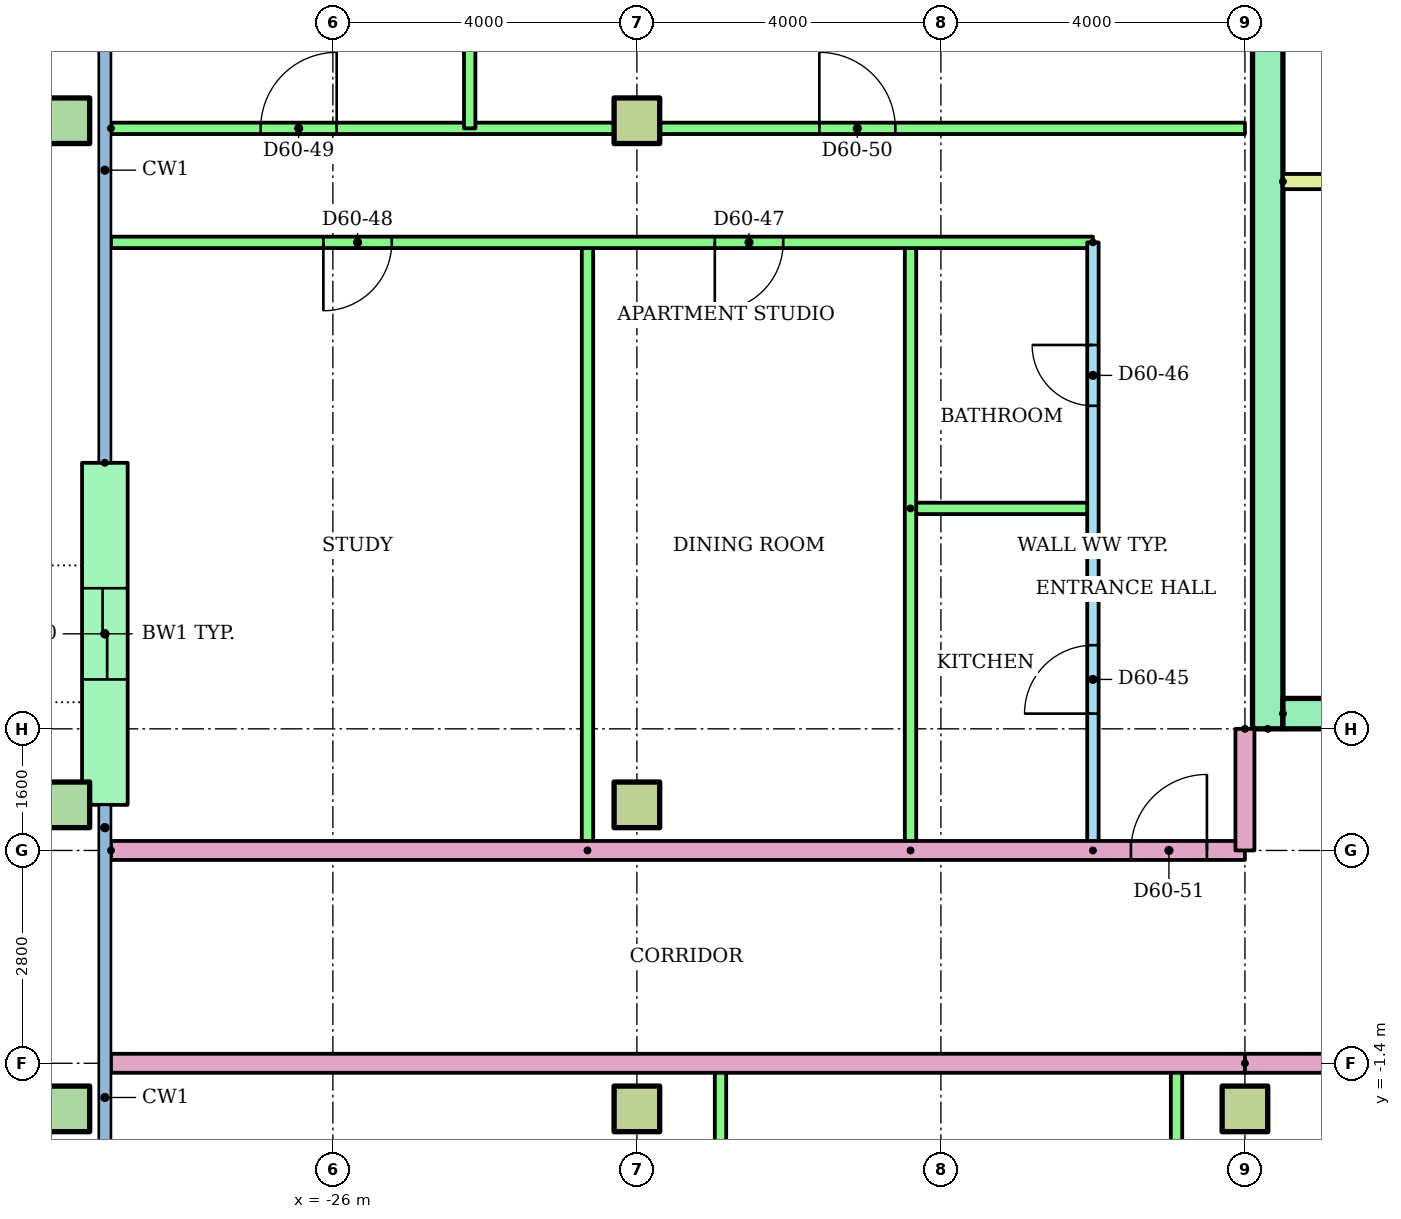
"""IFC4 building model, lengths in metres.
Left out: names, types, materials, properties, quantities, classifications, styles, units other than length and angle.
Written with IfcOpenShell. Run it as: python <this file> out.ifc"""

import sys

from ifc_helpers import new_model, si_unit, direction, frame, frame_2d, origin, origin_2d, place, context, subcontext, project, spatial, rectangle, hollow_rectangle, extrude, element, fill, save


model = new_model("IFC4")
c1 = context("Model", 3, precision=1e-05, world=origin(), true_north=direction((0.0, 1.0)))
c2 = subcontext(c1, "Body", "Model", "MODEL_VIEW")
j1 = project(units=[si_unit("LENGTHUNIT", "METRE"), si_unit("PLANEANGLEUNIT", "RADIAN")], contexts=[c1])
p1 = place(None, origin())
s1 = spatial("IfcSite", under=j1, at=p1, CompositionType="ELEMENT")
p2 = place(p1, origin())
s2 = spatial("IfcBuilding", under=s1, at=p2, CompositionType="ELEMENT")
p3 = place(p2, frame((0.0, 0.0, 230.0)))
s3 = spatial("IfcBuildingStorey", under=s2, at=p3, CompositionType="ELEMENT", Elevation=230.0)
p4 = place(p3, frame((-29.5, -2.0, 0.0)))
e1 = element("IfcColumn", 1, at=p4, inside=s3, PredefinedType="COLUMN", context=c2, shape_type="SweptSolid", body=[
    extrude(hollow_rectangle(XDim=0.6, YDim=0.6, WallThickness=0.03, at=origin_2d()), origin(), (0.0, 0.0, 1.0), 3.2),
])
for number, where in (
    (2, (-22.0, -2.0, 0.0)),
    (3, (-14.0, -2.0, 0.0)),
):
    element("IfcColumn", number, at=place(p3, frame(where)), inside=s3, PredefinedType="COLUMN", context=c2, shape_type="SweptSolid", body=[
        extrude(rectangle(XDim=0.6, YDim=0.6, at=origin_2d()), origin(), (0.0, 0.0, 1.0), 3.2),
    ])
p5 = place(p3, frame((-29.5, 2.0, 0.0)))
e4 = element("IfcColumn", 4, at=p5, inside=s3, PredefinedType="COLUMN", context=c2, shape_type="SweptSolid", body=[
    extrude(hollow_rectangle(XDim=0.6, YDim=0.6, WallThickness=0.03, at=origin_2d()), origin(), (0.0, 0.0, 1.0), 3.2),
])
p6 = place(p3, frame((-22.0, 2.0, 0.0)))
e5 = element("IfcColumn", 5, at=p6, inside=s3, PredefinedType="COLUMN", context=c2, shape_type="SweptSolid", body=[
    extrude(rectangle(XDim=0.6, YDim=0.6, at=origin_2d()), origin(), (0.0, 0.0, 1.0), 3.2),
])
p7 = place(p3, frame((-29.5, 11.0, 0.0)))
e6 = element("IfcColumn", 6, at=p7, inside=s3, PredefinedType="COLUMN", context=c2, shape_type="SweptSolid", body=[
    extrude(hollow_rectangle(XDim=0.6, YDim=0.6, WallThickness=0.03, at=origin_2d()), origin(), (0.0, 0.0, 1.0), 3.2),
])
p8 = place(p3, frame((-22.0, 11.0, 0.0)))
e7 = element("IfcColumn", 7, at=p8, inside=s3, PredefinedType="COLUMN", context=c2, shape_type="SweptSolid", body=[
    extrude(rectangle(XDim=0.6, YDim=0.6, at=origin_2d()), origin(), (0.0, 0.0, 1.0), 3.2),
])
p9 = place(p3, frame((-29.0, 6.5, 0.0), z_axis=(0.0, 0.0, 1.0), x_axis=(0.0, -1.0, 0.0)))
e8 = element("IfcWall", 8, at=p9, inside=s3, PredefinedType="STANDARD", context=c2, shape_type="SweptSolid", body=[
    extrude(rectangle(XDim=4.5, YDim=0.6, at=frame_2d((2.25, 0.0))), origin(), (0.0, 0.0, 1.0), 2.92),
])
p10 = place(p9, frame((1.65, 0.0, 0.0)))
e9 = element("IfcOpeningElement", 9, at=p10, cuts=e8, PredefinedType="OPENING", context=c2, shape_type="SweptSolid", body=[
    extrude(rectangle(XDim=1.2, YDim=2.1, at=frame_2d((0.6, 1.05))), frame((0.0, 0.31, 0.0), z_axis=(0.0, -1.0, 0.0), x_axis=(1.0, 0.0, 0.0)), (0.0, 0.0, 1.0), 0.62),
])
p11 = place(p3, frame((-13.7, 3.0, 0.0), z_axis=(0.0, 0.0, 1.0), x_axis=(0.0, 1.0, 0.0)))
e10 = element("IfcWall", 10, at=p11, inside=s3, PredefinedType="SHEAR", context=c2, shape_type="SweptSolid", body=[
    extrude(rectangle(XDim=17.0, YDim=0.4, at=frame_2d((8.5, 0.0))), origin(), (0.0, 0.0, 1.0), 2.92),
])
p12 = place(p3, frame((-13.5, 3.2, 0.0)))
e11 = element("IfcWall", 11, at=p12, inside=s3, PredefinedType="SHEAR", context=c2, shape_type="SweptSolid", body=[
    extrude(rectangle(XDim=27.0, YDim=0.4, at=frame_2d((13.5, 0.0))), origin(), (0.0, 0.0, 1.0), 2.92),
])
p13 = place(p12, frame((22.083, 0.0, 0.0)))
e12 = element("IfcOpeningElement", 12, at=p13, cuts=e11, PredefinedType="OPENING", context=c2, shape_type="SweptSolid", body=[
    extrude(rectangle(XDim=1.1, YDim=2.1, at=frame_2d((0.55, 1.05))), frame((0.0, 0.21, 0.0), z_axis=(0.0, -1.0, 0.0), x_axis=(1.0, 0.0, 0.0)), (0.0, 0.0, 1.0), 0.42),
])
p14 = place(p12, frame((25.128, 0.0, 0.0)))
e13 = element("IfcOpeningElement", 13, at=p14, cuts=e11, PredefinedType="OPENING", context=c2, shape_type="SweptSolid", body=[
    extrude(rectangle(XDim=1.1, YDim=2.1, at=frame_2d((0.55, 1.05))), frame((0.0, 0.21, 0.0), z_axis=(0.0, -1.0, 0.0), x_axis=(1.0, 0.0, 0.0)), (0.0, 0.0, 1.0), 0.42),
])
p15 = place(p12, frame((12.6, 0.0, 0.0)))
e14 = element("IfcOpeningElement", 14, at=p15, cuts=e11, PredefinedType="OPENING", context=c2, shape_type="SweptSolid", body=[
    extrude(rectangle(XDim=1.8, YDim=2.1, at=frame_2d((0.9, 1.05))), frame((0.0, 0.21, 0.0), z_axis=(0.0, -1.0, 0.0), x_axis=(1.0, 0.0, 0.0)), (0.0, 0.0, 1.0), 0.42),
])
p16 = place(p3, frame((-13.5, 10.2, 0.0)))
e15 = element("IfcWall", 15, at=p16, inside=s3, PredefinedType="PARTITIONING", context=c2, shape_type="SweptSolid", body=[
    extrude(rectangle(XDim=3.9, YDim=0.2, at=frame_2d((1.95, 0.0))), origin(), (0.0, 0.0, 1.0), 2.92),
])
for number, where, z_axis, x_axis in (
    (16, (-14.9, -7.0, 0.0), (0.0, 0.0, 1.0), (0.0, 1.0, 0.0)),
    (17, (-20.9, -7.0, 0.0), (0.0, 0.0, 1.0), (0.0, 1.0, 0.0)),
):
    element("IfcWall", number, at=place(p3, frame(where, z_axis=z_axis, x_axis=x_axis)), inside=s3, PredefinedType="PARTITIONING", context=c2, shape_type="SweptSolid", body=[
        extrude(rectangle(XDim=5.6, YDim=0.15, at=frame_2d((2.8, 0.0))), origin(), (0.0, 0.0, 1.0), 2.4),
    ])
p17 = place(p3, frame((-14.0, -1.4, 0.0), z_axis=(0.0, 0.0, 1.0), x_axis=(-1.0, 0.0, 0.0)))
e18 = element("IfcWall", 18, at=p17, inside=s3, PredefinedType="PARTITIONING", context=c2, shape_type="SweptSolid", body=[
    extrude(rectangle(XDim=14.92, YDim=0.25, at=frame_2d((7.46, 0.0))), origin(), (0.0, 0.0, 1.0), 2.4),
])
p18 = place(p3, frame((-16.0, 1.4, 0.0), z_axis=(0.0, 0.0, 1.0), x_axis=(0.0, 1.0, 0.0)))
e19 = element("IfcWall", 19, at=p18, inside=s3, PredefinedType="PARTITIONING", context=c2, shape_type="SweptSolid", body=[
    extrude(rectangle(XDim=8.0, YDim=0.15, at=frame_2d((4.0, 0.0))), origin(), (0.0, 0.0, 1.0), 2.4),
])
p19 = place(p18, frame((1.8, 0.0, 0.0)))
e20 = element("IfcOpeningElement", 20, at=p19, cuts=e19, PredefinedType="OPENING", context=c2, shape_type="SweptSolid", body=[
    extrude(rectangle(XDim=0.9, YDim=2.1, at=frame_2d((0.45, 1.05))), frame((0.0, 0.085, 0.0), z_axis=(0.0, -1.0, 0.0), x_axis=(1.0, 0.0, 0.0)), (0.0, 0.0, 1.0), 0.17),
])
p20 = place(p18, frame((5.85, 0.0, 0.0)))
e21 = element("IfcOpeningElement", 21, at=p20, cuts=e19, PredefinedType="OPENING", context=c2, shape_type="SweptSolid", body=[
    extrude(rectangle(XDim=0.8, YDim=2.1, at=frame_2d((0.4, 1.05))), frame((0.0, 0.085, 0.0), z_axis=(0.0, -1.0, 0.0), x_axis=(1.0, 0.0, 0.0)), (0.0, 0.0, 1.0), 0.17),
])
p21 = place(p3, frame((-18.4, 5.9, 0.0)))
e22 = element("IfcWall", 22, at=p21, inside=s3, PredefinedType="PARTITIONING", context=c2, shape_type="SweptSolid", body=[
    extrude(rectangle(XDim=2.4, YDim=0.15, at=frame_2d((1.2, 0.0))), origin(), (0.0, 0.0, 1.0), 2.4),
])
for number, where, z_axis, x_axis in (
    (23, (-18.4, 1.4, 0.0), (0.0, 0.0, 1.0), (0.0, 1.0, 0.0)),
    (24, (-22.65, 1.4, 0.0), (0.0, 0.0, 1.0), (0.0, 1.0, 0.0)),
):
    element("IfcWall", number, at=place(p3, frame(where, z_axis=z_axis, x_axis=x_axis)), inside=s3, PredefinedType="PARTITIONING", context=c2, shape_type="SweptSolid", body=[
        extrude(rectangle(XDim=8.0, YDim=0.15, at=frame_2d((4.0, 0.0))), origin(), (0.0, 0.0, 1.0), 2.4),
    ])
p22 = place(p3, frame((-16.0, 9.4, 0.0), z_axis=(0.0, 0.0, 1.0), x_axis=(-1.0, 0.0, 0.0)))
e25 = element("IfcWall", 25, at=p22, inside=s3, PredefinedType="PARTITIONING", context=c2, shape_type="SweptSolid", body=[
    extrude(rectangle(XDim=12.92, YDim=0.15, at=frame_2d((6.46, 0.0))), origin(), (0.0, 0.0, 1.0), 2.4),
])
p23 = place(p22, frame((4.075, 0.0, 0.0)))
e26 = element("IfcOpeningElement", 26, at=p23, cuts=e25, PredefinedType="OPENING", context=c2, shape_type="SweptSolid", body=[
    extrude(rectangle(XDim=0.9, YDim=2.1, at=frame_2d((0.45, 1.05))), frame((0.0, 0.085, 0.0), z_axis=(0.0, -1.0, 0.0), x_axis=(1.0, 0.0, 0.0)), (0.0, 0.0, 1.0), 0.17),
])
p24 = place(p22, frame((9.225, 0.0, 0.0)))
e27 = element("IfcOpeningElement", 27, at=p24, cuts=e25, PredefinedType="OPENING", context=c2, shape_type="SweptSolid", body=[
    extrude(rectangle(XDim=0.9, YDim=2.1, at=frame_2d((0.45, 1.05))), frame((0.0, 0.085, 0.0), z_axis=(0.0, -1.0, 0.0), x_axis=(1.0, 0.0, 0.0)), (0.0, 0.0, 1.0), 0.17),
])
p25 = place(p3, frame((-28.92, 10.9, 0.0)))
e28 = element("IfcWall", 28, at=p25, inside=s3, PredefinedType="PARTITIONING", context=c2, shape_type="SweptSolid", body=[
    extrude(rectangle(XDim=14.92, YDim=0.15, at=frame_2d((7.46, 0.0))), origin(), (0.0, 0.0, 1.0), 2.4),
])
p26 = place(p25, frame((1.97, 0.0, 0.0)))
e29 = element("IfcOpeningElement", 29, at=p26, cuts=e28, PredefinedType="OPENING", context=c2, shape_type="SweptSolid", body=[
    extrude(rectangle(XDim=1.0, YDim=2.1, at=frame_2d((0.5, 1.05))), frame((0.0, 0.085, 0.0), z_axis=(0.0, -1.0, 0.0), x_axis=(1.0, 0.0, 0.0)), (0.0, 0.0, 1.0), 0.17),
])
p27 = place(p25, frame((9.32, 0.0, 0.0)))
e30 = element("IfcOpeningElement", 30, at=p27, cuts=e28, PredefinedType="OPENING", context=c2, shape_type="SweptSolid", body=[
    extrude(rectangle(XDim=1.0, YDim=2.1, at=frame_2d((0.5, 1.05))), frame((0.0, 0.085, 0.0), z_axis=(0.0, -1.0, 0.0), x_axis=(1.0, 0.0, 0.0)), (0.0, 0.0, 1.0), 0.17),
])
p28 = place(p3, frame((-24.2, 17.12, 0.0), z_axis=(0.0, 0.0, 1.0), x_axis=(0.0, -1.0, 0.0)))
e31 = element("IfcWall", 31, at=p28, inside=s3, PredefinedType="PARTITIONING", context=c2, shape_type="SweptSolid", body=[
    extrude(rectangle(XDim=6.22, YDim=0.15, at=frame_2d((3.11, 0.0))), origin(), (0.0, 0.0, 1.0), 2.4),
])
p29 = place(p3, frame((-28.92, 1.4, 0.0)))
e32 = element("IfcWall", 32, at=p29, inside=s3, PredefinedType="PARTITIONING", context=c2, shape_type="SweptSolid", body=[
    extrude(rectangle(XDim=14.92, YDim=0.25, at=frame_2d((7.46, 0.0))), origin(), (0.0, 0.0, 1.0), 2.4),
])
p30 = place(p29, frame((13.42, 0.0, 0.0)))
e33 = element("IfcOpeningElement", 33, at=p30, cuts=e32, PredefinedType="OPENING", context=c2, shape_type="SweptSolid", body=[
    extrude(rectangle(XDim=1.0, YDim=2.1, at=frame_2d((0.5, 1.05))), frame((0.0, 0.135, 0.0), z_axis=(0.0, -1.0, 0.0), x_axis=(1.0, 0.0, 0.0)), (0.0, 0.0, 1.0), 0.27),
])
p31 = place(p3, frame((14.0, -1.4, 0.0), z_axis=(0.0, 0.0, 1.0), x_axis=(-1.0, 0.0, 0.0)))
e34 = element("IfcWall", 34, at=p31, inside=s3, PredefinedType="PARTITIONING", context=c2, shape_type="SweptSolid", body=[
    extrude(rectangle(XDim=28.0, YDim=0.25, at=frame_2d((14.0, 0.0))), origin(), (0.0, 0.0, 1.0), 2.4),
])
p32 = place(p31, frame((20.5, 0.0, 0.0)))
e35 = element("IfcOpeningElement", 35, at=p32, cuts=e34, PredefinedType="OPENING", context=c2, shape_type="SweptSolid", body=[
    extrude(rectangle(XDim=1.0, YDim=2.1, at=frame_2d((0.5, 1.05))), frame((0.0, 0.135, 0.0), z_axis=(0.0, -1.0, 0.0), x_axis=(1.0, 0.0, 0.0)), (0.0, 0.0, 1.0), 0.27),
])
p33 = place(p31, frame((18.5, 0.0, 0.0)))
e36 = element("IfcOpeningElement", 36, at=p33, cuts=e34, PredefinedType="OPENING", context=c2, shape_type="SweptSolid", body=[
    extrude(rectangle(XDim=1.0, YDim=2.1, at=frame_2d((0.5, 1.05))), frame((0.0, 0.135, 0.0), z_axis=(0.0, -1.0, 0.0), x_axis=(1.0, 0.0, 0.0)), (0.0, 0.0, 1.0), 0.27),
])
p34 = place(p31, frame((2.5, 0.0, 0.0)))
e37 = element("IfcOpeningElement", 37, at=p34, cuts=e34, PredefinedType="OPENING", context=c2, shape_type="SweptSolid", body=[
    extrude(rectangle(XDim=1.0, YDim=2.1, at=frame_2d((0.5, 1.05))), frame((0.0, 0.135, 0.0), z_axis=(0.0, -1.0, 0.0), x_axis=(1.0, 0.0, 0.0)), (0.0, 0.0, 1.0), 0.27),
])
p35 = place(p3, frame((-14.0, 3.0, 0.0), z_axis=(0.0, 0.0, 1.0), x_axis=(0.0, -1.0, 0.0)))
e38 = element("IfcWall", 38, at=p35, inside=s3, PredefinedType="PARTITIONING", context=c2, shape_type="SweptSolid", body=[
    extrude(rectangle(XDim=1.6, YDim=0.25, at=frame_2d((0.8, 0.0))), origin(), (0.0, 0.0, 1.0), 2.4),
])
p36 = place(p19, origin())
e39 = element("IfcDoor", 39, at=p36, inside=s3, OperationType="SINGLE_SWING_LEFT", PredefinedType="DOOR", context=c2, shape_type="SweptSolid", body=[
    extrude(rectangle(XDim=0.9, YDim=2.1, at=frame_2d((0.45, 1.05))), frame((0.0, 0.025, 0.0), z_axis=(0.0, -1.0, 0.0), x_axis=(1.0, 0.0, 0.0)), (0.0, 0.0, 1.0), 0.05),
])
fill(e20, e39)
p37 = place(p20, origin())
e40 = element("IfcDoor", 40, at=p37, inside=s3, OperationType="SINGLE_SWING_RIGHT", PredefinedType="DOOR", context=c2, shape_type="SweptSolid", body=[
    extrude(rectangle(XDim=0.8, YDim=2.1, at=frame_2d((0.4, 1.05))), frame((0.0, 0.025, 0.0), z_axis=(0.0, -1.0, 0.0), x_axis=(1.0, 0.0, 0.0)), (0.0, 0.0, 1.0), 0.05),
])
fill(e21, e40)
p38 = place(p23, origin())
e41 = element("IfcDoor", 41, at=p38, inside=s3, OperationType="SINGLE_SWING_RIGHT", PredefinedType="DOOR", context=c2, shape_type="SweptSolid", body=[
    extrude(rectangle(XDim=0.9, YDim=2.1, at=frame_2d((0.45, 1.05))), frame((0.0, 0.025, 0.0), z_axis=(0.0, -1.0, 0.0), x_axis=(1.0, 0.0, 0.0)), (0.0, 0.0, 1.0), 0.05),
])
fill(e26, e41)
p39 = place(p24, origin())
e42 = element("IfcDoor", 42, at=p39, inside=s3, OperationType="SINGLE_SWING_RIGHT", PredefinedType="DOOR", context=c2, shape_type="SweptSolid", body=[
    extrude(rectangle(XDim=0.9, YDim=2.1, at=frame_2d((0.45, 1.05))), frame((0.0, 0.025, 0.0), z_axis=(0.0, -1.0, 0.0), x_axis=(1.0, 0.0, 0.0)), (0.0, 0.0, 1.0), 0.05),
])
fill(e27, e42)
p40 = place(p26, origin())
e43 = element("IfcDoor", 43, at=p40, inside=s3, OperationType="SINGLE_SWING_RIGHT", PredefinedType="DOOR", context=c2, shape_type="SweptSolid", body=[
    extrude(rectangle(XDim=1.0, YDim=2.1, at=frame_2d((0.5, 1.05))), frame((0.0, 0.025, 0.0), z_axis=(0.0, -1.0, 0.0), x_axis=(1.0, 0.0, 0.0)), (0.0, 0.0, 1.0), 0.05),
])
fill(e29, e43)
p41 = place(p27, origin())
e44 = element("IfcDoor", 44, at=p41, inside=s3, OperationType="SINGLE_SWING_LEFT", PredefinedType="DOOR", context=c2, shape_type="SweptSolid", body=[
    extrude(rectangle(XDim=1.0, YDim=2.1, at=frame_2d((0.5, 1.05))), frame((0.0, 0.025, 0.0), z_axis=(0.0, -1.0, 0.0), x_axis=(1.0, 0.0, 0.0)), (0.0, 0.0, 1.0), 0.05),
])
fill(e30, e44)
p42 = place(p30, origin())
e45 = element("IfcDoor", 45, at=p42, inside=s3, OperationType="SINGLE_SWING_RIGHT", PredefinedType="DOOR", context=c2, shape_type="SweptSolid", body=[
    extrude(rectangle(XDim=1.0, YDim=2.1, at=frame_2d((0.5, 1.05))), frame((0.0, 0.025, 0.0), z_axis=(0.0, -1.0, 0.0), x_axis=(1.0, 0.0, 0.0)), (0.0, 0.0, 1.0), 0.05),
])
fill(e33, e45)
p43 = place(p10, origin())
e46 = element("IfcDoor", 46, at=p43, inside=s3, OperationType="SLIDING_TO_LEFT", PredefinedType="DOOR", context=c2, shape_type="SweptSolid", body=[
    extrude(rectangle(XDim=1.2, YDim=2.1, at=frame_2d((0.6, 1.05))), frame((0.0, 0.025, 0.0), z_axis=(0.0, -1.0, 0.0), x_axis=(1.0, 0.0, 0.0)), (0.0, 0.0, 1.0), 0.05),
])
fill(e9, e46)
save(model, sys.argv[1])
